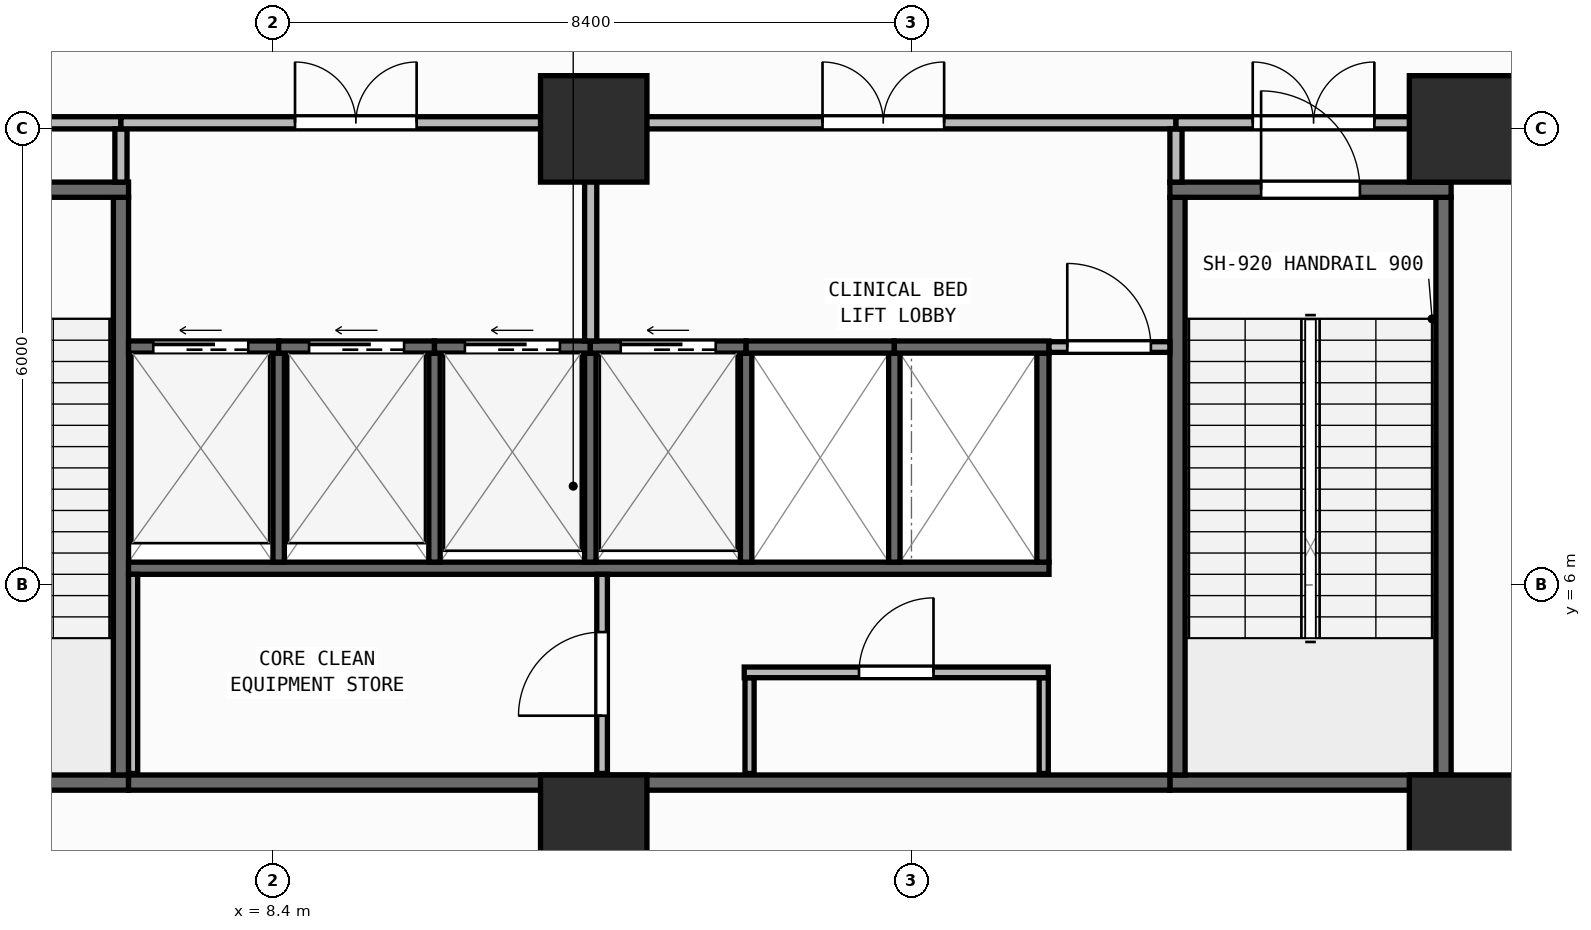
"""IFC4 building model, lengths in metres.
Left out: names, types, materials, properties, quantities, classifications, styles, units other than length and angle.
Written with IfcOpenShell. Run it as: python <this file> out.ifc"""

import sys

from ifc_helpers import new_model, si_unit, direction, frame, frame_2d, origin, origin_2d, place, context, subcontext, project, spatial, rectangle, extrude, element, fill, save


model = new_model("IFC4")
c1 = context("Model", 3, precision=1e-05, world=origin(), true_north=direction((0.0, 1.0)))
c2 = subcontext(c1, "Body", "Model", "MODEL_VIEW")
j1 = project(units=[si_unit("LENGTHUNIT", "METRE"), si_unit("PLANEANGLEUNIT", "RADIAN")], contexts=[c1])
p1 = place(None, origin())
s1 = spatial("IfcSite", under=j1, at=p1, CompositionType="ELEMENT")
p2 = place(p1, origin())
s2 = spatial("IfcBuilding", under=s1, at=p2, CompositionType="ELEMENT")
p3 = place(p2, frame((0.0, 0.0, 97.55)))
s3 = spatial("IfcBuildingStorey", under=s2, at=p3, CompositionType="ELEMENT", Elevation=97.55)
for number, where, z_axis, x_axis in (
    (1, (12.62, 2.8, 0.0), (0.0, 0.0, 1.0), (1.0, 0.0, 0.0)),
    (2, (24.05, 2.8, 0.0), (0.0, 0.0, 1.0), (1.0, 0.0, 0.0)),
    (3, (12.62, 12.0, 0.0), (0.0, 0.0, 1.0), (1.0, 0.0, 0.0)),
    (4, (24.05, 12.0, 0.0), (0.0, 0.0, 1.0), (1.0, 0.0, 0.0)),
):
    element("IfcColumn", number, at=place(p3, frame(where, z_axis=z_axis, x_axis=x_axis)), inside=s3, PredefinedType="COLUMN", context=c2, shape_type="SweptSolid", body=[
        extrude(rectangle(XDim=1.4, YDim=1.4, at=origin_2d()), origin(), (0.0, 0.0, 1.0), 5.8),
    ])
p4 = place(p3, frame((2.8, 3.4, 0.0), z_axis=(0.0, 0.0, 1.0), x_axis=(1.0, 0.0, 0.0)))
e5 = element("IfcWall", 5, at=p4, inside=s3, PredefinedType="SHEAR", context=c2, shape_type="SweptSolid", body=[
    extrude(rectangle(XDim=3.7, YDim=0.2, at=frame_2d((1.85, 0.0))), origin(), (0.0, 0.0, 1.0), 5.56),
])
p5 = place(p3, frame((6.4, 3.5, 0.0), z_axis=(0.0, 0.0, 1.0), x_axis=(0.0, 1.0, 0.0)))
e6 = element("IfcWall", 6, at=p5, inside=s3, PredefinedType="SHEAR", context=c2, shape_type="SweptSolid", body=[
    extrude(rectangle(XDim=7.6, YDim=0.2, at=frame_2d((3.8, 0.0))), origin(), (0.0, 0.0, 1.0), 5.56),
])
p6 = place(p3, frame((2.8, 11.2, 0.0), z_axis=(0.0, 0.0, 1.0), x_axis=(1.0, 0.0, 0.0)))
e7 = element("IfcWall", 7, at=p6, inside=s3, PredefinedType="SHEAR", context=c2, shape_type="SweptSolid", body=[
    extrude(rectangle(XDim=3.7, YDim=0.2, at=frame_2d((1.85, 0.0))), origin(), (0.0, 0.0, 1.0), 5.56),
])
p7 = place(p6, frame((1.2, 0.0, 0.0)))
e8 = element("IfcOpeningElement", 8, at=p7, cuts=e7, PredefinedType="OPENING", context=c2, shape_type="SweptSolid", body=[
    extrude(rectangle(XDim=1.3, YDim=2.15, at=frame_2d((0.65, 1.075))), frame((0.0, 0.11, 0.0), z_axis=(0.0, -1.0, 0.0), x_axis=(1.0, 0.0, 0.0)), (0.0, 0.0, 1.0), 0.22),
])
p8 = place(p3, frame((20.2, 3.4, 0.0), z_axis=(0.0, 0.0, 1.0), x_axis=(1.0, 0.0, 0.0)))
e9 = element("IfcWall", 9, at=p8, inside=s3, PredefinedType="SHEAR", context=c2, shape_type="SweptSolid", body=[
    extrude(rectangle(XDim=3.7, YDim=0.2, at=frame_2d((1.85, 0.0))), origin(), (0.0, 0.0, 1.0), 5.56),
])
for number, where, z_axis, x_axis in (
    (10, (20.3, 3.5, 0.0), (0.0, 0.0, 1.0), (0.0, 1.0, 0.0)),
    (11, (23.8, 3.5, 0.0), (0.0, 0.0, 1.0), (0.0, 1.0, 0.0)),
):
    element("IfcWall", number, at=place(p3, frame(where, z_axis=z_axis, x_axis=x_axis)), inside=s3, PredefinedType="SHEAR", context=c2, shape_type="SweptSolid", body=[
        extrude(rectangle(XDim=7.6, YDim=0.2, at=frame_2d((3.8, 0.0))), origin(), (0.0, 0.0, 1.0), 5.56),
    ])
p9 = place(p3, frame((20.2, 11.2, 0.0), z_axis=(0.0, 0.0, 1.0), x_axis=(1.0, 0.0, 0.0)))
e12 = element("IfcWall", 12, at=p9, inside=s3, PredefinedType="SHEAR", context=c2, shape_type="SweptSolid", body=[
    extrude(rectangle(XDim=3.7, YDim=0.2, at=frame_2d((1.85, 0.0))), origin(), (0.0, 0.0, 1.0), 5.56),
])
p10 = place(p9, frame((1.2, 0.0, 0.0)))
e13 = element("IfcOpeningElement", 13, at=p10, cuts=e12, PredefinedType="OPENING", context=c2, shape_type="SweptSolid", body=[
    extrude(rectangle(XDim=1.3, YDim=2.15, at=frame_2d((0.65, 1.075))), frame((0.0, 0.11, 0.0), z_axis=(0.0, -1.0, 0.0), x_axis=(1.0, 0.0, 0.0)), (0.0, 0.0, 1.0), 0.22),
])
p11 = place(p3, frame((6.5, 3.4, 0.0), z_axis=(0.0, 0.0, 1.0), x_axis=(1.0, 0.0, 0.0)))
e14 = element("IfcWall", 14, at=p11, inside=s3, PredefinedType="SHEAR", context=c2, shape_type="SweptSolid", body=[
    extrude(rectangle(XDim=13.7, YDim=0.2, at=frame_2d((6.85, 0.0))), origin(), (0.0, 0.0, 1.0), 5.56),
])
p12 = place(p3, frame((6.5, 6.22, 0.0), z_axis=(0.0, 0.0, 1.0), x_axis=(1.0, 0.0, 0.0)))
e15 = element("IfcWall", 15, at=p12, inside=s3, PredefinedType="SHEAR", context=c2, shape_type="SweptSolid", body=[
    extrude(rectangle(XDim=12.11, YDim=0.16, at=frame_2d((6.055, 0.0))), origin(), (0.0, 0.0, 1.0), 5.56),
])
p13 = place(p3, frame((18.53, 6.3, 0.0), z_axis=(0.0, 0.0, 1.0), x_axis=(0.0, 1.0, 0.0)))
e16 = element("IfcWall", 16, at=p13, inside=s3, PredefinedType="SHEAR", context=c2, shape_type="SweptSolid", body=[
    extrude(rectangle(XDim=2.75, YDim=0.16, at=frame_2d((1.375, 0.0))), origin(), (0.0, 0.0, 1.0), 5.56),
])
for number, where, z_axis, x_axis in (
    (17, (8.475, 6.3, 0.0), (0.0, 0.0, 1.0), (0.0, 1.0, 0.0)),
    (18, (10.525, 6.3, 0.0), (0.0, 0.0, 1.0), (0.0, 1.0, 0.0)),
    (19, (12.575, 6.3, 0.0), (0.0, 0.0, 1.0), (0.0, 1.0, 0.0)),
    (20, (14.625, 6.3, 0.0), (0.0, 0.0, 1.0), (0.0, 1.0, 0.0)),
    (21, (16.575, 6.3, 0.0), (0.0, 0.0, 1.0), (0.0, 1.0, 0.0)),
):
    element("IfcWall", number, at=place(p3, frame(where, z_axis=z_axis, x_axis=x_axis)), inside=s3, PredefinedType="SHEAR", context=c2, shape_type="SweptSolid", body=[
        extrude(rectangle(XDim=2.75, YDim=0.15, at=frame_2d((1.375, 0.0))), origin(), (0.0, 0.0, 1.0), 5.56),
    ])
p14 = place(p3, frame((6.5, 9.13, 0.0), z_axis=(0.0, 0.0, 1.0), x_axis=(1.0, 0.0, 0.0)))
e22 = element("IfcWall", 22, at=p14, inside=s3, PredefinedType="SHEAR", context=c2, shape_type="SweptSolid", body=[
    extrude(rectangle(XDim=1.975, YDim=0.16, at=frame_2d((0.988, 0.0))), origin(), (0.0, 0.0, 1.0), 5.56),
])
p15 = place(p14, frame((0.325, 0.0, 0.0)))
e23 = element("IfcOpeningElement", 23, at=p15, cuts=e22, PredefinedType="OPENING", context=c2, shape_type="SweptSolid", body=[
    extrude(rectangle(XDim=1.25, YDim=2.15, at=frame_2d((0.625, 1.075))), frame((0.0, 0.09, 0.0), z_axis=(0.0, -1.0, 0.0), x_axis=(1.0, 0.0, 0.0)), (0.0, 0.0, 1.0), 0.18),
])
p16 = place(p3, frame((8.475, 9.13, 0.0), z_axis=(0.0, 0.0, 1.0), x_axis=(1.0, 0.0, 0.0)))
e24 = element("IfcWall", 24, at=p16, inside=s3, PredefinedType="SHEAR", context=c2, shape_type="SweptSolid", body=[
    extrude(rectangle(XDim=2.05, YDim=0.16, at=frame_2d((1.025, 0.0))), origin(), (0.0, 0.0, 1.0), 5.56),
])
p17 = place(p16, frame((0.4, 0.0, 0.0)))
e25 = element("IfcOpeningElement", 25, at=p17, cuts=e24, PredefinedType="OPENING", context=c2, shape_type="SweptSolid", body=[
    extrude(rectangle(XDim=1.25, YDim=2.15, at=frame_2d((0.625, 1.075))), frame((0.0, 0.09, 0.0), z_axis=(0.0, -1.0, 0.0), x_axis=(1.0, 0.0, 0.0)), (0.0, 0.0, 1.0), 0.18),
])
p18 = place(p3, frame((10.525, 9.13, 0.0), z_axis=(0.0, 0.0, 1.0), x_axis=(1.0, 0.0, 0.0)))
e26 = element("IfcWall", 26, at=p18, inside=s3, PredefinedType="SHEAR", context=c2, shape_type="SweptSolid", body=[
    extrude(rectangle(XDim=2.05, YDim=0.16, at=frame_2d((1.025, 0.0))), origin(), (0.0, 0.0, 1.0), 5.56),
])
p19 = place(p18, frame((0.4, 0.0, 0.0)))
e27 = element("IfcOpeningElement", 27, at=p19, cuts=e26, PredefinedType="OPENING", context=c2, shape_type="SweptSolid", body=[
    extrude(rectangle(XDim=1.25, YDim=2.15, at=frame_2d((0.625, 1.075))), frame((0.0, 0.09, 0.0), z_axis=(0.0, -1.0, 0.0), x_axis=(1.0, 0.0, 0.0)), (0.0, 0.0, 1.0), 0.18),
])
p20 = place(p3, frame((12.575, 9.13, 0.0), z_axis=(0.0, 0.0, 1.0), x_axis=(1.0, 0.0, 0.0)))
e28 = element("IfcWall", 28, at=p20, inside=s3, PredefinedType="SHEAR", context=c2, shape_type="SweptSolid", body=[
    extrude(rectangle(XDim=2.05, YDim=0.16, at=frame_2d((1.025, 0.0))), origin(), (0.0, 0.0, 1.0), 5.56),
])
p21 = place(p20, frame((0.4, 0.0, 0.0)))
e29 = element("IfcOpeningElement", 29, at=p21, cuts=e28, PredefinedType="OPENING", context=c2, shape_type="SweptSolid", body=[
    extrude(rectangle(XDim=1.25, YDim=2.15, at=frame_2d((0.625, 1.075))), frame((0.0, 0.09, 0.0), z_axis=(0.0, -1.0, 0.0), x_axis=(1.0, 0.0, 0.0)), (0.0, 0.0, 1.0), 0.18),
])
p22 = place(p3, frame((14.625, 9.13, 0.0), z_axis=(0.0, 0.0, 1.0), x_axis=(1.0, 0.0, 0.0)))
e30 = element("IfcWall", 30, at=p22, inside=s3, PredefinedType="SHEAR", context=c2, shape_type="SweptSolid", body=[
    extrude(rectangle(XDim=1.95, YDim=0.16, at=frame_2d((0.975, 0.0))), origin(), (0.0, 0.0, 1.0), 5.56),
])
p23 = place(p3, frame((16.575, 9.13, 0.0), z_axis=(0.0, 0.0, 1.0), x_axis=(1.0, 0.0, 0.0)))
e31 = element("IfcWall", 31, at=p23, inside=s3, PredefinedType="SHEAR", context=c2, shape_type="SweptSolid", body=[
    extrude(rectangle(XDim=2.035, YDim=0.16, at=frame_2d((1.018, 0.0))), origin(), (0.0, 0.0, 1.0), 5.56),
])
p24 = place(p3, frame((6.56, 3.52, 0.0), z_axis=(0.0, 0.0, 1.0), x_axis=(0.0, 1.0, 0.0)))
e32 = element("IfcWall", 32, at=p24, inside=s3, PredefinedType="PARTITIONING", context=c2, shape_type="SweptSolid", body=[
    extrude(rectangle(XDim=2.62, YDim=0.12, at=frame_2d((1.31, 0.0))), origin(), (0.0, 0.0, 1.0), 5.56),
])
p25 = place(p3, frame((12.73, 3.52, 0.0), z_axis=(0.0, 0.0, 1.0), x_axis=(0.0, 1.0, 0.0)))
e33 = element("IfcWall", 33, at=p25, inside=s3, PredefinedType="PARTITIONING", context=c2, shape_type="SweptSolid", body=[
    extrude(rectangle(XDim=2.62, YDim=0.14, at=frame_2d((1.31, 0.0))), origin(), (0.0, 0.0, 1.0), 5.56),
])
p26 = place(p25, frame((0.76, 0.0, 0.0)))
e34 = element("IfcOpeningElement", 34, at=p26, cuts=e33, PredefinedType="OPENING", context=c2, shape_type="SweptSolid", body=[
    extrude(rectangle(XDim=1.1, YDim=2.1, at=frame_2d((0.55, 1.05))), frame((0.0, 0.08, 0.0), z_axis=(0.0, -1.0, 0.0), x_axis=(1.0, 0.0, 0.0)), (0.0, 0.0, 1.0), 0.16),
])
for number, where, z_axis, x_axis in (
    (35, (14.67, 3.52, 0.0), (0.0, 0.0, 1.0), (0.0, 1.0, 0.0)),
    (36, (18.54, 3.52, 0.0), (0.0, 0.0, 1.0), (0.0, 1.0, 0.0)),
):
    element("IfcWall", number, at=place(p3, frame(where, z_axis=z_axis, x_axis=x_axis)), inside=s3, PredefinedType="PARTITIONING", context=c2, shape_type="SweptSolid", body=[
        extrude(rectangle(XDim=1.26, YDim=0.12, at=frame_2d((0.63, 0.0))), origin(), (0.0, 0.0, 1.0), 5.56),
    ])
p27 = place(p3, frame((14.6, 4.85, 0.0), z_axis=(0.0, 0.0, 1.0), x_axis=(1.0, 0.0, 0.0)))
e37 = element("IfcWall", 37, at=p27, inside=s3, PredefinedType="PARTITIONING", context=c2, shape_type="SweptSolid", body=[
    extrude(rectangle(XDim=4.0, YDim=0.14, at=frame_2d((2.0, 0.0))), origin(), (0.0, 0.0, 1.0), 5.56),
])
p28 = place(p27, frame((1.51, 0.0, 0.0)))
e38 = element("IfcOpeningElement", 38, at=p28, cuts=e37, PredefinedType="OPENING", context=c2, shape_type="SweptSolid", body=[
    extrude(rectangle(XDim=0.98, YDim=2.1, at=frame_2d((0.49, 1.05))), frame((0.0, 0.08, 0.0), z_axis=(0.0, -1.0, 0.0), x_axis=(1.0, 0.0, 0.0)), (0.0, 0.0, 1.0), 0.16),
])
p29 = place(p3, frame((18.61, 9.13, 0.0), z_axis=(0.0, 0.0, 1.0), x_axis=(1.0, 0.0, 0.0)))
e39 = element("IfcWall", 39, at=p29, inside=s3, PredefinedType="PARTITIONING", context=c2, shape_type="SweptSolid", body=[
    extrude(rectangle(XDim=1.59, YDim=0.14, at=frame_2d((0.795, 0.0))), origin(), (0.0, 0.0, 1.0), 5.56),
])
p30 = place(p29, frame((0.24, 0.0, 0.0)))
e40 = element("IfcOpeningElement", 40, at=p30, cuts=e39, PredefinedType="OPENING", context=c2, shape_type="SweptSolid", body=[
    extrude(rectangle(XDim=1.1, YDim=2.1, at=frame_2d((0.55, 1.05))), frame((0.0, 0.08, 0.0), z_axis=(0.0, -1.0, 0.0), x_axis=(1.0, 0.0, 0.0)), (0.0, 0.0, 1.0), 0.16),
])
p31 = place(p3, frame((2.8, 12.08, 0.0), z_axis=(0.0, 0.0, 1.0), x_axis=(1.0, 0.0, 0.0)))
e41 = element("IfcWall", 41, at=p31, inside=s3, PredefinedType="PARTITIONING", context=c2, shape_type="SweptSolid", body=[
    extrude(rectangle(XDim=3.6, YDim=0.16, at=frame_2d((1.8, 0.0))), origin(), (0.0, 0.0, 1.0), 4.835),
])
p32 = place(p31, frame((1.0, 0.0, 0.0)))
e42 = element("IfcOpeningElement", 42, at=p32, cuts=e41, PredefinedType="OPENING", context=c2, shape_type="SweptSolid", body=[
    extrude(rectangle(XDim=1.6, YDim=2.05, at=frame_2d((0.8, 1.025))), frame((0.0, 0.09, 0.0), z_axis=(0.0, -1.0, 0.0), x_axis=(1.0, 0.0, 0.0)), (0.0, 0.0, 1.0), 0.18),
])
p33 = place(p3, frame((6.4, 11.3, 0.0), z_axis=(0.0, 0.0, 1.0), x_axis=(0.0, 1.0, 0.0)))
e43 = element("IfcWall", 43, at=p33, inside=s3, PredefinedType="PARTITIONING", context=c2, shape_type="SweptSolid", body=[
    extrude(rectangle(XDim=0.7, YDim=0.16, at=frame_2d((0.35, 0.0))), origin(), (0.0, 0.0, 1.0), 5.56),
])
p34 = place(p3, frame((6.4, 12.08, 0.0), z_axis=(0.0, 0.0, 1.0), x_axis=(1.0, 0.0, 0.0)))
e44 = element("IfcWall", 44, at=p34, inside=s3, PredefinedType="PARTITIONING", context=c2, shape_type="SweptSolid", body=[
    extrude(rectangle(XDim=6.18, YDim=0.16, at=frame_2d((3.09, 0.0))), origin(), (0.0, 0.0, 1.0), 4.835),
])
p35 = place(p34, frame((2.29, 0.0, 0.0)))
e45 = element("IfcOpeningElement", 45, at=p35, cuts=e44, PredefinedType="OPENING", context=c2, shape_type="SweptSolid", body=[
    extrude(rectangle(XDim=1.6, YDim=2.05, at=frame_2d((0.8, 1.025))), frame((0.0, 0.09, 0.0), z_axis=(0.0, -1.0, 0.0), x_axis=(1.0, 0.0, 0.0)), (0.0, 0.0, 1.0), 0.18),
])
p36 = place(p3, frame((12.58, 9.21, 0.0), z_axis=(0.0, 0.0, 1.0), x_axis=(0.0, 1.0, 0.0)))
e46 = element("IfcWall", 46, at=p36, inside=s3, PredefinedType="PARTITIONING", context=c2, shape_type="SweptSolid", body=[
    extrude(rectangle(XDim=2.79, YDim=0.16, at=frame_2d((1.395, 0.0))), origin(), (0.0, 0.0, 1.0), 5.56),
])
p37 = place(p3, frame((12.58, 12.08, 0.0), z_axis=(0.0, 0.0, 1.0), x_axis=(1.0, 0.0, 0.0)))
e47 = element("IfcWall", 47, at=p37, inside=s3, PredefinedType="PARTITIONING", context=c2, shape_type="SweptSolid", body=[
    extrude(rectangle(XDim=7.7, YDim=0.16, at=frame_2d((3.85, 0.0))), origin(), (0.0, 0.0, 1.0), 4.835),
])
p38 = place(p37, frame((3.05, 0.0, 0.0)))
e48 = element("IfcOpeningElement", 48, at=p38, cuts=e47, PredefinedType="OPENING", context=c2, shape_type="SweptSolid", body=[
    extrude(rectangle(XDim=1.6, YDim=2.05, at=frame_2d((0.8, 1.025))), frame((0.0, 0.09, 0.0), z_axis=(0.0, -1.0, 0.0), x_axis=(1.0, 0.0, 0.0)), (0.0, 0.0, 1.0), 0.18),
])
p39 = place(p3, frame((20.28, 11.3, 0.0), z_axis=(0.0, 0.0, 1.0), x_axis=(0.0, 1.0, 0.0)))
e49 = element("IfcWall", 49, at=p39, inside=s3, PredefinedType="PARTITIONING", context=c2, shape_type="SweptSolid", body=[
    extrude(rectangle(XDim=0.7, YDim=0.16, at=frame_2d((0.35, 0.0))), origin(), (0.0, 0.0, 1.0), 5.56),
])
p40 = place(p3, frame((20.28, 12.08, 0.0), z_axis=(0.0, 0.0, 1.0), x_axis=(1.0, 0.0, 0.0)))
e50 = element("IfcWall", 50, at=p40, inside=s3, PredefinedType="PARTITIONING", context=c2, shape_type="SweptSolid", body=[
    extrude(rectangle(XDim=3.62, YDim=0.16, at=frame_2d((1.81, 0.0))), origin(), (0.0, 0.0, 1.0), 4.835),
])
p41 = place(p40, frame((1.01, 0.0, 0.0)))
e51 = element("IfcOpeningElement", 51, at=p41, cuts=e50, PredefinedType="OPENING", context=c2, shape_type="SweptSolid", body=[
    extrude(rectangle(XDim=1.6, YDim=2.05, at=frame_2d((0.8, 1.025))), frame((0.0, 0.09, 0.0), z_axis=(0.0, -1.0, 0.0), x_axis=(1.0, 0.0, 0.0)), (0.0, 0.0, 1.0), 0.18),
])
p42 = place(p3, frame((23.82, 11.3, 0.0), z_axis=(0.0, 0.0, 1.0), x_axis=(0.0, 1.0, 0.0)))
e52 = element("IfcWall", 52, at=p42, inside=s3, PredefinedType="PARTITIONING", context=c2, shape_type="SweptSolid", body=[
    extrude(rectangle(XDim=0.7, YDim=0.16, at=frame_2d((0.35, 0.0))), origin(), (0.0, 0.0, 1.0), 5.56),
])
p43 = place(p3, frame((23.92, 12.08, 0.0), z_axis=(0.0, 0.0, 1.0), x_axis=(1.0, 0.0, 0.0)))
e53 = element("IfcWall", 53, at=p43, inside=s3, PredefinedType="PARTITIONING", context=c2, shape_type="SweptSolid", body=[
    extrude(rectangle(XDim=1.86, YDim=0.16, at=frame_2d((0.93, 0.0))), origin(), (0.0, 0.0, 1.0), 4.835),
])
p44 = place(p10, origin())
e54 = element("IfcDoor", 54, at=p44, inside=s3, OperationType="SINGLE_SWING_LEFT", PredefinedType="DOOR", context=c2, shape_type="SweptSolid", body=[
    extrude(rectangle(XDim=1.3, YDim=2.15, at=frame_2d((0.65, 1.075))), frame((0.0, 0.025, 0.0), z_axis=(0.0, -1.0, 0.0), x_axis=(1.0, 0.0, 0.0)), (0.0, 0.0, 1.0), 0.05),
])
fill(e13, e54)
p45 = place(p15, origin())
e55 = element("IfcDoor", 55, at=p45, inside=s3, OperationType="SLIDING_TO_LEFT", PredefinedType="DOOR", context=c2, shape_type="SweptSolid", body=[
    extrude(rectangle(XDim=1.25, YDim=2.15, at=frame_2d((0.625, 1.075))), frame((0.0, 0.025, 0.0), z_axis=(0.0, -1.0, 0.0), x_axis=(1.0, 0.0, 0.0)), (0.0, 0.0, 1.0), 0.05),
])
fill(e23, e55)
p46 = place(p17, origin())
e56 = element("IfcDoor", 56, at=p46, inside=s3, OperationType="SLIDING_TO_LEFT", PredefinedType="DOOR", context=c2, shape_type="SweptSolid", body=[
    extrude(rectangle(XDim=1.25, YDim=2.15, at=frame_2d((0.625, 1.075))), frame((0.0, 0.025, 0.0), z_axis=(0.0, -1.0, 0.0), x_axis=(1.0, 0.0, 0.0)), (0.0, 0.0, 1.0), 0.05),
])
fill(e25, e56)
p47 = place(p19, origin())
e57 = element("IfcDoor", 57, at=p47, inside=s3, OperationType="SLIDING_TO_LEFT", PredefinedType="DOOR", context=c2, shape_type="SweptSolid", body=[
    extrude(rectangle(XDim=1.25, YDim=2.15, at=frame_2d((0.625, 1.075))), frame((0.0, 0.025, 0.0), z_axis=(0.0, -1.0, 0.0), x_axis=(1.0, 0.0, 0.0)), (0.0, 0.0, 1.0), 0.05),
])
fill(e27, e57)
p48 = place(p21, origin())
e58 = element("IfcDoor", 58, at=p48, inside=s3, OperationType="SLIDING_TO_LEFT", PredefinedType="DOOR", context=c2, shape_type="SweptSolid", body=[
    extrude(rectangle(XDim=1.25, YDim=2.15, at=frame_2d((0.625, 1.075))), frame((0.0, 0.025, 0.0), z_axis=(0.0, -1.0, 0.0), x_axis=(1.0, 0.0, 0.0)), (0.0, 0.0, 1.0), 0.05),
])
fill(e29, e58)
p49 = place(p26, origin())
e59 = element("IfcDoor", 59, at=p49, inside=s3, OperationType="SINGLE_SWING_LEFT", PredefinedType="DOOR", context=c2, shape_type="SweptSolid", body=[
    extrude(rectangle(XDim=1.1, YDim=2.1, at=frame_2d((0.55, 1.05))), frame((0.0, 0.025, 0.0), z_axis=(0.0, -1.0, 0.0), x_axis=(1.0, 0.0, 0.0)), (0.0, 0.0, 1.0), 0.05),
])
fill(e34, e59)
p50 = place(p28, origin())
e60 = element("IfcDoor", 60, at=p50, inside=s3, OperationType="SINGLE_SWING_RIGHT", PredefinedType="DOOR", context=c2, shape_type="SweptSolid", body=[
    extrude(rectangle(XDim=0.98, YDim=2.1, at=frame_2d((0.49, 1.05))), frame((0.0, 0.025, 0.0), z_axis=(0.0, -1.0, 0.0), x_axis=(1.0, 0.0, 0.0)), (0.0, 0.0, 1.0), 0.05),
])
fill(e38, e60)
p51 = place(p30, origin())
e61 = element("IfcDoor", 61, at=p51, inside=s3, OperationType="SINGLE_SWING_LEFT", PredefinedType="DOOR", context=c2, shape_type="SweptSolid", body=[
    extrude(rectangle(XDim=1.1, YDim=2.1, at=frame_2d((0.55, 1.05))), frame((0.0, 0.025, 0.0), z_axis=(0.0, -1.0, 0.0), x_axis=(1.0, 0.0, 0.0)), (0.0, 0.0, 1.0), 0.05),
])
fill(e40, e61)
p52 = place(p35, origin())
e62 = element("IfcDoor", 62, at=p52, inside=s3, OperationType="DOUBLE_DOOR_SINGLE_SWING", PredefinedType="DOOR", context=c2, shape_type="SweptSolid", body=[
    extrude(rectangle(XDim=1.6, YDim=2.05, at=frame_2d((0.8, 1.025))), frame((0.0, 0.025, 0.0), z_axis=(0.0, -1.0, 0.0), x_axis=(1.0, 0.0, 0.0)), (0.0, 0.0, 1.0), 0.05),
])
fill(e45, e62)
p53 = place(p38, origin())
e63 = element("IfcDoor", 63, at=p53, inside=s3, OperationType="DOUBLE_DOOR_SINGLE_SWING", PredefinedType="DOOR", context=c2, shape_type="SweptSolid", body=[
    extrude(rectangle(XDim=1.6, YDim=2.05, at=frame_2d((0.8, 1.025))), frame((0.0, 0.025, 0.0), z_axis=(0.0, -1.0, 0.0), x_axis=(1.0, 0.0, 0.0)), (0.0, 0.0, 1.0), 0.05),
])
fill(e48, e63)
p54 = place(p41, origin())
e64 = element("IfcDoor", 64, at=p54, inside=s3, OperationType="DOUBLE_DOOR_SINGLE_SWING", PredefinedType="DOOR", context=c2, shape_type="SweptSolid", body=[
    extrude(rectangle(XDim=1.6, YDim=2.05, at=frame_2d((0.8, 1.025))), frame((0.0, 0.025, 0.0), z_axis=(0.0, -1.0, 0.0), x_axis=(1.0, 0.0, 0.0)), (0.0, 0.0, 1.0), 0.05),
])
fill(e51, e64)
save(model, sys.argv[1])
